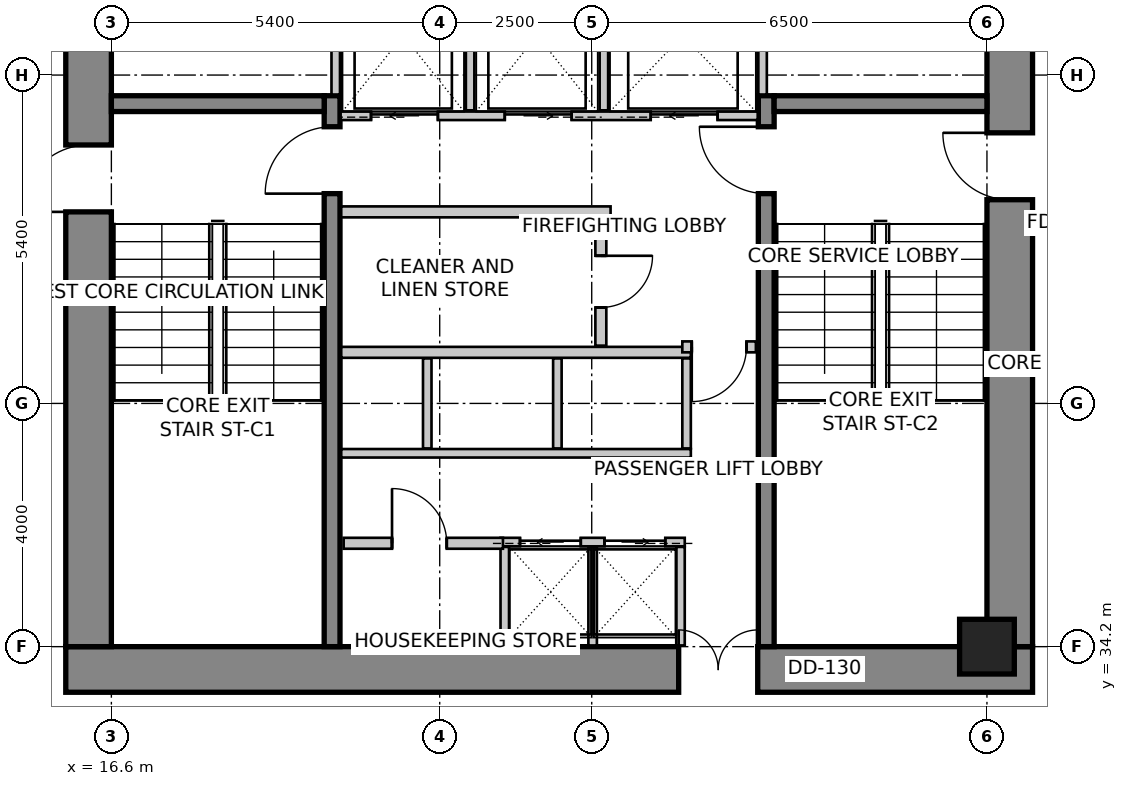
"""IFC4 building model, lengths in metres.
Left out: names, types, materials, properties, quantities, classifications, styles, units other than length and angle.
Written with IfcOpenShell. Run it as: python <this file> out.ifc"""

import sys

from ifc_helpers import new_model, si_unit, direction, frame, frame_2d, origin, origin_2d, place, context, subcontext, project, spatial, rectangle, extrude, source, transform, mapped, element, fill, save


model = new_model("IFC4")
c1 = context("Model", 3, precision=1e-05, world=origin(), true_north=direction((0.0, 1.0)))
c2 = subcontext(c1, "Body", "Model", "MODEL_VIEW")
j1 = project(units=[si_unit("LENGTHUNIT", "METRE"), si_unit("PLANEANGLEUNIT", "RADIAN")], contexts=[c1])
p1 = place(None, origin())
s1 = spatial("IfcSite", under=j1, at=p1, CompositionType="ELEMENT")
p2 = place(p1, origin())
s2 = spatial("IfcBuilding", under=s1, at=p2, CompositionType="ELEMENT")
p3 = place(p2, frame((0.0, 0.0, 164.6)))
s3 = spatial("IfcBuildingStorey", under=s2, at=p3, CompositionType="ELEMENT", Elevation=164.6)
p4 = place(p3, frame((15.85, 33.825, 0.0), z_axis=(0.0, 0.0, 1.0), x_axis=(1.0, 0.0, 0.0)))
e1 = element("IfcWall", 1, at=p4, inside=s3, PredefinedType="SHEAR", context=c2, shape_type="SweptSolid", body=[
    extrude(rectangle(XDim=15.9, YDim=0.75, at=frame_2d((7.95, 0.0))), origin(), (0.0, 0.0, 1.0), 3.6),
])
m1 = source(origin(), c2, "Body", "SweptSolid", [
    extrude(rectangle(XDim=1.3, YDim=2.15, at=frame_2d((0.65, 1.075))), frame((0.0, 0.385, 0.0), z_axis=(0.0, -1.0, 0.0), x_axis=(1.0, 0.0, 0.0)), (0.0, 0.0, 1.0), 0.77),
])
p5 = place(p4, frame((10.08, 0.0, 0.0)))
e2 = element("IfcOpeningElement", 2, at=p5, cuts=e1, PredefinedType="OPENING", context=c2, shape_type="MappedRepresentation", body=[
    mapped(m1, transform((0.0, 0.0, 0.0), scale=1.0)),
])
p6 = place(p3, frame((16.225, 34.2, 0.0), z_axis=(0.0, 0.0, 1.0), x_axis=(0.0, 1.0, 0.0)))
e3 = element("IfcWall", 3, at=p6, inside=s3, PredefinedType="SHEAR", context=c2, shape_type="SweptSolid", body=[
    extrude(rectangle(XDim=11.4, YDim=0.75, at=frame_2d((5.7, 0.0))), origin(), (0.0, 0.0, 1.0), 3.6),
])
m2 = source(origin(), c2, "Body", "SweptSolid", [
    extrude(rectangle(XDim=1.1, YDim=2.15, at=frame_2d((0.55, 1.075))), frame((0.0, 0.385, 0.0), z_axis=(0.0, -1.0, 0.0), x_axis=(1.0, 0.0, 0.0)), (0.0, 0.0, 1.0), 0.77),
])
p7 = place(p6, frame((7.15, 0.0, 0.0)))
e4 = element("IfcOpeningElement", 4, at=p7, cuts=e3, PredefinedType="OPENING", context=c2, shape_type="MappedRepresentation", body=[
    mapped(m2, transform((0.0, 0.0, 0.0), scale=1.0)),
])
p8 = place(p3, frame((31.375, 34.2, 0.0), z_axis=(0.0, 0.0, 1.0), x_axis=(0.0, 1.0, 0.0)))
e5 = element("IfcWall", 5, at=p8, inside=s3, PredefinedType="SHEAR", context=c2, shape_type="SweptSolid", body=[
    extrude(rectangle(XDim=11.4, YDim=0.75, at=frame_2d((5.7, 0.0))), origin(), (0.0, 0.0, 1.0), 3.6),
])
p9 = place(p8, frame((7.35, 0.0, 0.0)))
e6 = element("IfcOpeningElement", 6, at=p9, cuts=e5, PredefinedType="OPENING", context=c2, shape_type="MappedRepresentation", body=[
    mapped(m2, transform((0.0, 0.0, 0.0), scale=1.0)),
])
p10 = place(p3, frame((20.23, 34.2, 0.0), z_axis=(0.0, 0.0, 1.0), x_axis=(0.0, 1.0, 0.0)))
e7 = element("IfcWall", 7, at=p10, inside=s3, PredefinedType="SHEAR", context=c2, shape_type="SweptSolid", body=[
    extrude(rectangle(XDim=9.06, YDim=0.26, at=frame_2d((4.53, 0.0))), origin(), (0.0, 0.0, 1.0), 3.6),
])
m3 = source(origin(), c2, "Body", "SweptSolid", [
    extrude(rectangle(XDim=1.1, YDim=2.15, at=frame_2d((0.55, 1.075))), frame((0.0, 0.14, 0.0), z_axis=(0.0, -1.0, 0.0), x_axis=(1.0, 0.0, 0.0)), (0.0, 0.0, 1.0), 0.28),
])
p11 = place(p10, frame((7.45, 0.0, 0.0)))
e8 = element("IfcOpeningElement", 8, at=p11, cuts=e7, PredefinedType="OPENING", context=c2, shape_type="MappedRepresentation", body=[
    mapped(m3, transform((0.0, 0.0, 0.0), scale=1.0)),
])
p12 = place(p3, frame((27.37, 34.2, 0.0), z_axis=(0.0, 0.0, 1.0), x_axis=(0.0, 1.0, 0.0)))
e9 = element("IfcWall", 9, at=p12, inside=s3, PredefinedType="SHEAR", context=c2, shape_type="SweptSolid", body=[
    extrude(rectangle(XDim=9.06, YDim=0.26, at=frame_2d((4.53, 0.0))), origin(), (0.0, 0.0, 1.0), 3.6),
])
p13 = place(p12, frame((7.45, 0.0, 0.0)))
e10 = element("IfcOpeningElement", 10, at=p13, cuts=e9, PredefinedType="OPENING", context=c2, shape_type="MappedRepresentation", body=[
    mapped(m3, transform((0.0, 0.0, 0.0), scale=1.0)),
])
for number, where, z_axis, x_axis in (
    (11, (16.6, 43.13, 0.0), (0.0, 0.0, 1.0), (1.0, 0.0, 0.0)),
    (12, (27.5, 43.13, 0.0), (0.0, 0.0, 1.0), (1.0, 0.0, 0.0)),
):
    element("IfcWall", number, at=place(p3, frame(where, z_axis=z_axis, x_axis=x_axis)), inside=s3, PredefinedType="SHEAR", context=c2, shape_type="SweptSolid", body=[
        extrude(rectangle(XDim=3.5, YDim=0.26, at=frame_2d((1.75, 0.0))), origin(), (0.0, 0.0, 1.0), 3.6),
    ])
m4 = source(origin(), c2, "Body", "SweptSolid", [
    extrude(rectangle(XDim=0.9, YDim=0.9, at=origin_2d()), origin(), (0.0, 0.0, 1.0), 3.6),
])
p14 = place(p3, frame((31.0, 34.2, 0.0), z_axis=(0.0, 0.0, 1.0), x_axis=(1.0, 0.0, 0.0)))
e13 = element("IfcColumn", 13, at=p14, inside=s3, PredefinedType="COLUMN", context=c2, shape_type="MappedRepresentation", body=[
    mapped(m4, transform((0.0, 0.0, 0.0), scale=1.0)),
])
p15 = place(p3, frame((20.37, 42.93, 0.0), z_axis=(0.0, 0.0, 1.0), x_axis=(1.0, 0.0, 0.0)))
e14 = element("IfcWall", 14, at=p15, inside=s3, PredefinedType="SOLIDWALL", context=c2, shape_type="SweptSolid", body=[
    extrude(rectangle(XDim=6.86, YDim=0.14, at=frame_2d((3.43, 0.0))), origin(), (0.0, 0.0, 1.0), 3.35),
])
m5 = source(origin(), c2, "Body", "SweptSolid", [
    extrude(rectangle(XDim=1.1, YDim=2.15, at=frame_2d((0.55, 1.075))), frame((0.0, 0.08, 0.0), z_axis=(0.0, -1.0, 0.0), x_axis=(1.0, 0.0, 0.0)), (0.0, 0.0, 1.0), 0.16),
])
p16 = place(p15, frame((0.5, 0.0, 0.0)))
e15 = element("IfcOpeningElement", 15, at=p16, cuts=e14, PredefinedType="OPENING", context=c2, shape_type="MappedRepresentation", body=[
    mapped(m5, transform((0.0, 0.0, 0.0), scale=1.0)),
])
p17 = place(p15, frame((2.7, 0.0, 0.0)))
e16 = element("IfcOpeningElement", 16, at=p17, cuts=e14, PredefinedType="OPENING", context=c2, shape_type="MappedRepresentation", body=[
    mapped(m5, transform((0.0, 0.0, 0.0), scale=1.0)),
])
p18 = place(p15, frame((5.1, 0.0, 0.0)))
e17 = element("IfcOpeningElement", 17, at=p18, cuts=e14, PredefinedType="OPENING", context=c2, shape_type="MappedRepresentation", body=[
    mapped(m5, transform((0.0, 0.0, 0.0), scale=1.0)),
])
for number, where, z_axis, x_axis in (
    (18, (20.29, 43.28, 0.0), (0.0, 0.0, 1.0), (0.0, 1.0, 0.0)),
    (19, (27.31, 43.28, 0.0), (0.0, 0.0, 1.0), (0.0, 1.0, 0.0)),
):
    element("IfcWall", number, at=place(p3, frame(where, z_axis=z_axis, x_axis=x_axis)), inside=s3, PredefinedType="SOLIDWALL", context=c2, shape_type="SweptSolid", body=[
        extrude(rectangle(XDim=2.3, YDim=0.14, at=frame_2d((1.15, 0.0))), origin(), (0.0, 0.0, 1.0), 3.35),
    ])
for number, where, z_axis, x_axis in (
    (20, (22.5, 43.02, 0.0), (0.0, 0.0, 1.0), (0.0, 1.0, 0.0)),
    (21, (24.7, 43.02, 0.0), (0.0, 0.0, 1.0), (0.0, 1.0, 0.0)),
):
    element("IfcWall", number, at=place(p3, frame(where, z_axis=z_axis, x_axis=x_axis)), inside=s3, PredefinedType="SOLIDWALL", context=c2, shape_type="SweptSolid", body=[
        extrude(rectangle(XDim=2.56, YDim=0.14, at=frame_2d((1.28, 0.0))), origin(), (0.0, 0.0, 1.0), 3.35),
    ])
p19 = place(p3, frame((23.0, 35.92, 0.0), z_axis=(0.0, 0.0, 1.0), x_axis=(1.0, 0.0, 0.0)))
e22 = element("IfcWall", 22, at=p19, inside=s3, PredefinedType="SOLIDWALL", context=c2, shape_type="SweptSolid", body=[
    extrude(rectangle(XDim=3.03, YDim=0.14, at=frame_2d((1.515, 0.0))), origin(), (0.0, 0.0, 1.0), 3.35),
])
m6 = source(origin(), c2, "Body", "SweptSolid", [
    extrude(rectangle(XDim=1.0, YDim=2.15, at=frame_2d((0.5, 1.075))), frame((0.0, 0.08, 0.0), z_axis=(0.0, -1.0, 0.0), x_axis=(1.0, 0.0, 0.0)), (0.0, 0.0, 1.0), 0.16),
])
p20 = place(p19, frame((0.32, 0.0, 0.0)))
e23 = element("IfcOpeningElement", 23, at=p20, cuts=e22, PredefinedType="OPENING", context=c2, shape_type="MappedRepresentation", body=[
    mapped(m6, transform((0.0, 0.0, 0.0), scale=1.0)),
])
p21 = place(p19, frame((1.71, 0.0, 0.0)))
e24 = element("IfcOpeningElement", 24, at=p21, cuts=e22, PredefinedType="OPENING", context=c2, shape_type="MappedRepresentation", body=[
    mapped(m6, transform((0.0, 0.0, 0.0), scale=1.0)),
])
for number, where, z_axis, x_axis in (
    (25, (25.96, 34.22, 0.0), (0.0, 0.0, 1.0), (0.0, 1.0, 0.0)),
    (26, (23.07, 34.22, 0.0), (0.0, 0.0, 1.0), (0.0, 1.0, 0.0)),
    (27, (24.515, 34.22, 0.0), (0.0, 0.0, 1.0), (0.0, 1.0, 0.0)),
):
    element("IfcWall", number, at=place(p3, frame(where, z_axis=z_axis, x_axis=x_axis)), inside=s3, PredefinedType="SOLIDWALL", context=c2, shape_type="SweptSolid", body=[
        extrude(rectangle(XDim=1.62, YDim=0.14, at=frame_2d((0.81, 0.0))), origin(), (0.0, 0.0, 1.0), 2.642),
    ])
p22 = place(p3, frame((20.38, 37.38, 0.0), z_axis=(0.0, 0.0, 1.0), x_axis=(1.0, 0.0, 0.0)))
e28 = element("IfcWall", 28, at=p22, inside=s3, PredefinedType="SOLIDWALL", context=c2, shape_type="SweptSolid", body=[
    extrude(rectangle(XDim=5.75, YDim=0.14, at=frame_2d((2.875, 0.0))), origin(), (0.0, 0.0, 1.0), 3.35),
])
p23 = place(p3, frame((20.38, 39.04, 0.0), z_axis=(0.0, 0.0, 1.0), x_axis=(1.0, 0.0, 0.0)))
e29 = element("IfcWall", 29, at=p23, inside=s3, PredefinedType="SOLIDWALL", context=c2, shape_type="SweptSolid", body=[
    extrude(rectangle(XDim=5.75, YDim=0.18, at=frame_2d((2.875, 0.0))), origin(), (0.0, 0.0, 1.0), 3.35),
])
for number, where, z_axis, x_axis in (
    (30, (26.06, 37.46, 0.0), (0.0, 0.0, 1.0), (0.0, 1.0, 0.0)),
    (31, (21.795, 37.46, 0.0), (0.0, 0.0, 1.0), (0.0, 1.0, 0.0)),
    (32, (23.935, 37.46, 0.0), (0.0, 0.0, 1.0), (0.0, 1.0, 0.0)),
):
    element("IfcWall", number, at=place(p3, frame(where, z_axis=z_axis, x_axis=x_axis)), inside=s3, PredefinedType="SOLIDWALL", context=c2, shape_type="SweptSolid", body=[
        extrude(rectangle(XDim=1.48, YDim=0.14, at=frame_2d((0.74, 0.0))), origin(), (0.0, 0.0, 1.0), 3.35),
    ])
p24 = place(p3, frame((24.81, 41.35, 0.0), z_axis=(0.0, 0.0, 1.0), x_axis=(-1.0, 0.0, 0.0)))
e33 = element("IfcWall", 33, at=p24, inside=s3, PredefinedType="PARTITIONING", context=c2, shape_type="SweptSolid", body=[
    extrude(rectangle(XDim=4.43, YDim=0.18, at=frame_2d((2.215, 0.0))), origin(), (0.0, 0.0, 1.0), 3.35),
])
p25 = place(p3, frame((24.65, 41.256, 0.0), z_axis=(0.0, 0.0, 1.0), x_axis=(0.0, -1.0, 0.0)))
e34 = element("IfcWall", 34, at=p25, inside=s3, PredefinedType="PARTITIONING", context=c2, shape_type="SweptSolid", body=[
    extrude(rectangle(XDim=2.106, YDim=0.18, at=frame_2d((1.053, 0.0))), origin(), (0.0, 0.0, 1.0), 3.35),
])
m7 = source(origin(), c2, "Body", "SweptSolid", [
    extrude(rectangle(XDim=0.85, YDim=2.15, at=frame_2d((0.425, 1.075))), frame((0.0, 0.1, 0.0), z_axis=(0.0, -1.0, 0.0), x_axis=(1.0, 0.0, 0.0)), (0.0, 0.0, 1.0), 0.2),
])
p26 = place(p25, frame((0.628, 0.0, 0.0)))
e35 = element("IfcOpeningElement", 35, at=p26, cuts=e34, PredefinedType="OPENING", context=c2, shape_type="MappedRepresentation", body=[
    mapped(m7, transform((0.0, 0.0, 0.0), scale=1.0)),
])
p27 = place(p3, frame((27.2, 39.13, 0.0), z_axis=(0.0, 0.0, 1.0), x_axis=(-1.0, 0.0, 0.0)))
e36 = element("IfcWall", 36, at=p27, inside=s3, PredefinedType="PARTITIONING", context=c2, shape_type="SweptSolid", body=[
    extrude(rectangle(XDim=1.21, YDim=0.18, at=frame_2d((0.605, 0.0))), origin(), (0.0, 0.0, 1.0), 3.35),
])
m8 = source(origin(), c2, "Body", "SweptSolid", [
    extrude(rectangle(XDim=0.9, YDim=2.15, at=frame_2d((0.45, 1.075))), frame((0.0, 0.1, 0.0), z_axis=(0.0, -1.0, 0.0), x_axis=(1.0, 0.0, 0.0)), (0.0, 0.0, 1.0), 0.2),
])
p28 = place(p27, frame((0.155, 0.0, 0.0)))
e37 = element("IfcOpeningElement", 37, at=p28, cuts=e36, PredefinedType="OPENING", context=c2, shape_type="MappedRepresentation", body=[
    mapped(m8, transform((0.0, 0.0, 0.0), scale=1.0)),
])
p29 = place(p3, frame((20.42, 35.9, 0.0), z_axis=(0.0, 0.0, 1.0), x_axis=(1.0, 0.0, 0.0)))
e38 = element("IfcWall", 38, at=p29, inside=s3, PredefinedType="PARTITIONING", context=c2, shape_type="SweptSolid", body=[
    extrude(rectangle(XDim=2.62, YDim=0.18, at=frame_2d((1.31, 0.0))), origin(), (0.0, 0.0, 1.0), 3.35),
])
p30 = place(p29, frame((0.796, 0.0, 0.0)))
e39 = element("IfcOpeningElement", 39, at=p30, cuts=e38, PredefinedType="OPENING", context=c2, shape_type="MappedRepresentation", body=[
    mapped(m8, transform((0.0, 0.0, 0.0), scale=1.0)),
])
m9 = source(origin(), c2, "Body", "SweptSolid", [
    extrude(rectangle(XDim=1.1, YDim=2.15, at=frame_2d((0.55, 1.075))), frame((0.0, 0.025, 0.0), z_axis=(0.0, -1.0, 0.0), x_axis=(1.0, 0.0, 0.0)), (0.0, 0.0, 1.0), 0.05),
])
p31 = place(p16, origin())
e40 = element("IfcDoor", 40, at=p31, inside=s3, OperationType="SLIDING_TO_LEFT", PredefinedType="DOOR", context=c2, shape_type="MappedRepresentation", body=[
    mapped(m9, transform((0.0, 0.0, 0.0), scale=1.0)),
])
fill(e15, e40)
p32 = place(p17, origin())
e41 = element("IfcDoor", 41, at=p32, inside=s3, OperationType="SLIDING_TO_RIGHT", PredefinedType="DOOR", context=c2, shape_type="MappedRepresentation", body=[
    mapped(m9, transform((0.0, 0.0, 0.0), scale=1.0)),
])
fill(e16, e41)
m10 = source(origin(), c2, "Body", "SweptSolid", [
    extrude(rectangle(XDim=1.1, YDim=2.15, at=frame_2d((0.55, 1.075))), frame((0.0, 0.025, 0.0), z_axis=(0.0, -1.0, 0.0), x_axis=(1.0, 0.0, 0.0)), (0.0, 0.0, 1.0), 0.05),
])
p33 = place(p18, origin())
e42 = element("IfcDoor", 42, at=p33, inside=s3, OperationType="SLIDING_TO_LEFT", PredefinedType="DOOR", context=c2, shape_type="MappedRepresentation", body=[
    mapped(m10, transform((0.0, 0.0, 0.0), scale=1.0)),
])
fill(e17, e42)
m11 = source(origin(), c2, "Body", "SweptSolid", [
    extrude(rectangle(XDim=1.0, YDim=2.15, at=frame_2d((0.5, 1.075))), frame((0.0, 0.025, 0.0), z_axis=(0.0, -1.0, 0.0), x_axis=(1.0, 0.0, 0.0)), (0.0, 0.0, 1.0), 0.05),
])
p34 = place(p20, origin())
e43 = element("IfcDoor", 43, at=p34, inside=s3, OperationType="SLIDING_TO_LEFT", PredefinedType="DOOR", context=c2, shape_type="MappedRepresentation", body=[
    mapped(m11, transform((0.0, 0.0, 0.0), scale=1.0)),
])
fill(e23, e43)
p35 = place(p21, origin())
e44 = element("IfcDoor", 44, at=p35, inside=s3, OperationType="SLIDING_TO_RIGHT", PredefinedType="DOOR", context=c2, shape_type="MappedRepresentation", body=[
    mapped(m11, transform((0.0, 0.0, 0.0), scale=1.0)),
])
fill(e24, e44)
m12 = source(origin(), c2, "Body", "SweptSolid", [
    extrude(rectangle(XDim=1.1, YDim=2.15, at=frame_2d((0.55, 1.075))), frame((0.0, 0.025, 0.0), z_axis=(0.0, -1.0, 0.0), x_axis=(1.0, 0.0, 0.0)), (0.0, 0.0, 1.0), 0.05),
])
p36 = place(p11, origin())
e45 = element("IfcDoor", 45, at=p36, inside=s3, OperationType="SINGLE_SWING_LEFT", PredefinedType="DOOR", context=c2, shape_type="MappedRepresentation", body=[
    mapped(m12, transform((0.0, 0.0, 0.0), scale=1.0)),
])
fill(e8, e45)
p37 = place(p13, origin())
e46 = element("IfcDoor", 46, at=p37, inside=s3, OperationType="SINGLE_SWING_RIGHT", PredefinedType="DOOR", context=c2, shape_type="MappedRepresentation", body=[
    mapped(m12, transform((0.0, 0.0, 0.0), scale=1.0)),
])
fill(e10, e46)
p38 = place(p7, origin())
e47 = element("IfcDoor", 47, at=p38, inside=s3, OperationType="SINGLE_SWING_LEFT", PredefinedType="DOOR", context=c2, shape_type="MappedRepresentation", body=[
    mapped(m12, transform((0.0, 0.0, 0.0), scale=1.0)),
])
fill(e4, e47)
p39 = place(p9, origin())
e48 = element("IfcDoor", 48, at=p39, inside=s3, OperationType="SINGLE_SWING_RIGHT", PredefinedType="DOOR", context=c2, shape_type="MappedRepresentation", body=[
    mapped(m12, transform((0.0, 0.0, 0.0), scale=1.0)),
])
fill(e6, e48)
m13 = source(origin(), c2, "Body", "SweptSolid", [
    extrude(rectangle(XDim=1.3, YDim=2.15, at=frame_2d((0.65, 1.075))), frame((0.0, 0.025, 0.0), z_axis=(0.0, -1.0, 0.0), x_axis=(1.0, 0.0, 0.0)), (0.0, 0.0, 1.0), 0.05),
])
p40 = place(p5, origin())
e49 = element("IfcDoor", 49, at=p40, inside=s3, OperationType="DOUBLE_DOOR_SINGLE_SWING", PredefinedType="DOOR", context=c2, shape_type="MappedRepresentation", body=[
    mapped(m13, transform((0.0, 0.0, 0.0), scale=1.0)),
])
fill(e2, e49)
m14 = source(origin(), c2, "Body", "SweptSolid", [
    extrude(rectangle(XDim=0.85, YDim=2.15, at=frame_2d((0.425, 1.075))), frame((0.0, 0.025, 0.0), z_axis=(0.0, -1.0, 0.0), x_axis=(1.0, 0.0, 0.0)), (0.0, 0.0, 1.0), 0.05),
])
p41 = place(p26, origin())
e50 = element("IfcDoor", 50, at=p41, inside=s3, OperationType="SINGLE_SWING_LEFT", PredefinedType="DOOR", context=c2, shape_type="MappedRepresentation", body=[
    mapped(m14, transform((0.0, 0.0, 0.0), scale=1.0)),
])
fill(e35, e50)
m15 = source(origin(), c2, "Body", "SweptSolid", [
    extrude(rectangle(XDim=0.9, YDim=2.15, at=frame_2d((0.45, 1.075))), frame((0.0, 0.025, 0.0), z_axis=(0.0, -1.0, 0.0), x_axis=(1.0, 0.0, 0.0)), (0.0, 0.0, 1.0), 0.05),
])
p42 = place(p28, origin())
e51 = element("IfcDoor", 51, at=p42, inside=s3, OperationType="SINGLE_SWING_RIGHT", PredefinedType="DOOR", context=c2, shape_type="MappedRepresentation", body=[
    mapped(m15, transform((0.0, 0.0, 0.0), scale=1.0)),
])
fill(e37, e51)
p43 = place(p30, origin())
e52 = element("IfcDoor", 52, at=p43, inside=s3, OperationType="SINGLE_SWING_LEFT", PredefinedType="DOOR", context=c2, shape_type="MappedRepresentation", body=[
    mapped(m15, transform((0.0, 0.0, 0.0), scale=1.0)),
])
fill(e39, e52)
save(model, sys.argv[1])
